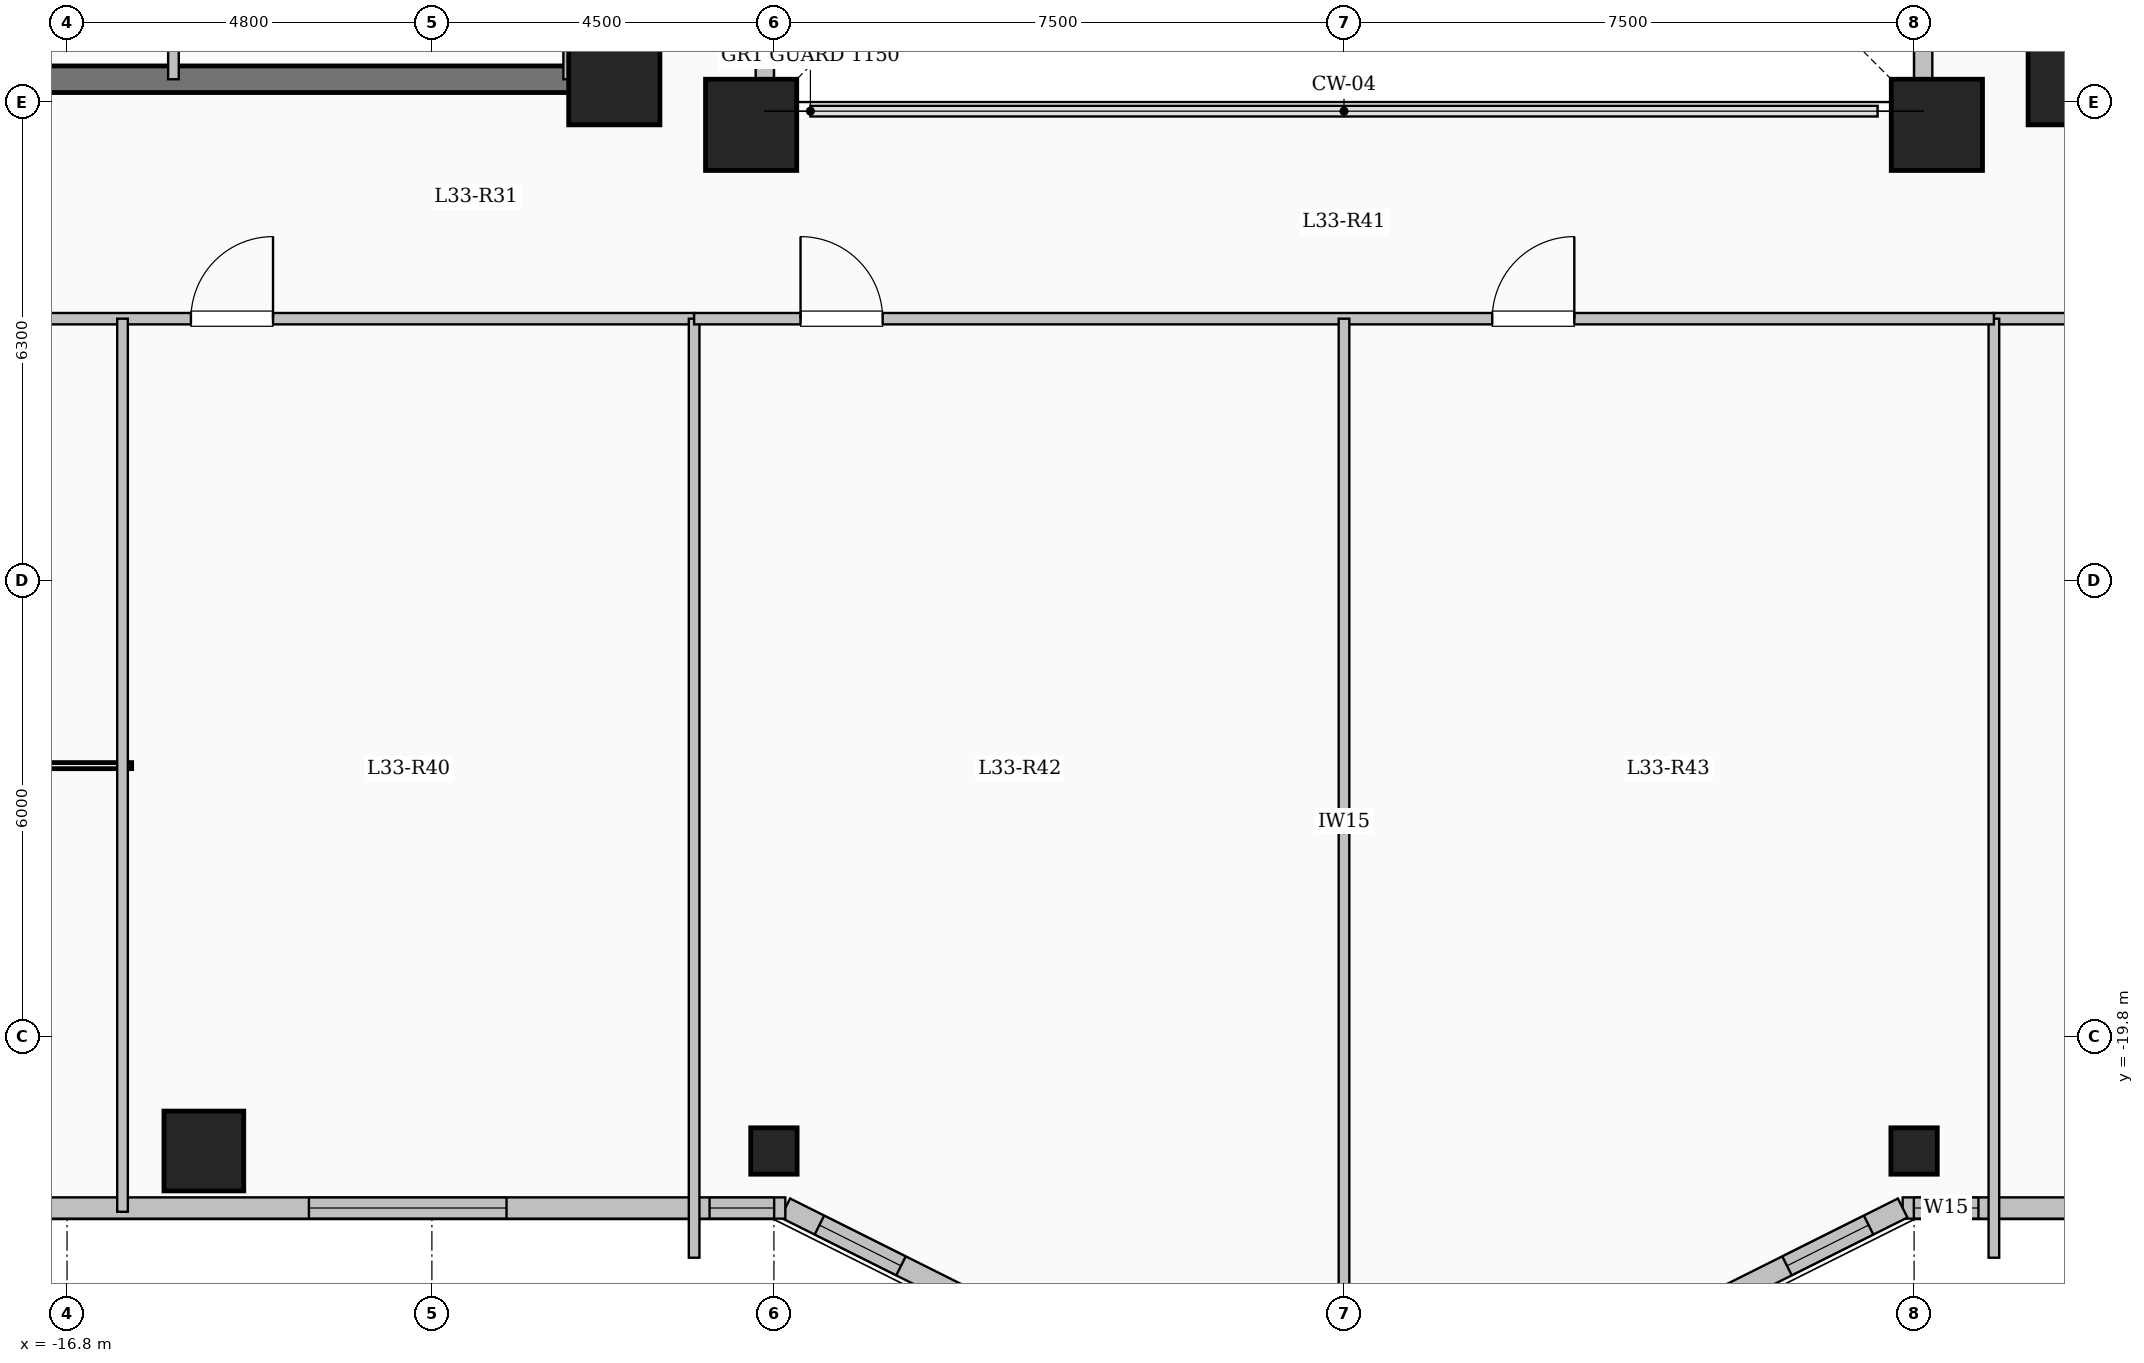
"""IFC4 building model, lengths in metres.
Left out: names, types, materials, properties, quantities, classifications, styles, units other than length and angle.
Written with IfcOpenShell. Run it as: python <this file> out.ifc"""

import sys

from ifc_helpers import new_model, si_unit, direction, frame, frame_2d, origin, origin_2d, place, context, subcontext, project, spatial, rectangle, hollow_circle, extrude, element, fill, save


model = new_model("IFC4")
c1 = context("Model", 3, precision=1e-05, world=origin(), true_north=direction((0.0, 1.0)))
c2 = subcontext(c1, "Body", "Model", "MODEL_VIEW")
j1 = project(units=[si_unit("LENGTHUNIT", "METRE"), si_unit("PLANEANGLEUNIT", "RADIAN")], contexts=[c1])
p1 = place(None, origin())
s1 = spatial("IfcSite", under=j1, at=p1, CompositionType="ELEMENT")
p2 = place(p1, origin())
s2 = spatial("IfcBuilding", under=s1, at=p2, CompositionType="ELEMENT")
p3 = place(p2, frame((0.0, 0.0, 123.0)))
s3 = spatial("IfcBuildingStorey", under=s2, at=p3, CompositionType="ELEMENT", Elevation=123.0)
for number, where, z_axis, x_axis in (
    (1, (-7.8, -7.8, 0.0), (0.0, 0.0, 1.0), (1.0, 0.0, 0.0)),
    (2, (7.8, -7.8, 0.0), (0.0, 0.0, 1.0), (1.0, 0.0, 0.0)),
    (3, (-9.6, -7.2, 0.0), (0.0, 0.0, 1.0), (1.0, 0.0, 0.0)),
    (4, (9.6, -7.2, 0.0), (0.0, 0.0, 1.0), (1.0, 0.0, 0.0)),
):
    element("IfcColumn", number, at=place(p3, frame(where, z_axis=z_axis, x_axis=x_axis)), inside=s3, PredefinedType="COLUMN", context=c2, shape_type="SweptSolid", body=[
        extrude(rectangle(XDim=1.2, YDim=1.2, at=origin_2d()), origin(), (0.0, 0.0, 1.0), 4.5),
    ])
p4 = place(p3, frame((-15.0, -21.3, 0.0), z_axis=(0.0, 0.0, 1.0), x_axis=(1.0, 0.0, 0.0)))
e5 = element("IfcColumn", 5, at=p4, inside=s3, PredefinedType="COLUMN", context=c2, shape_type="SweptSolid", body=[
    extrude(rectangle(XDim=1.05, YDim=1.05, at=origin_2d()), origin(), (0.0, 0.0, 1.0), 4.5),
])
for number, where, z_axis, x_axis in (
    (6, (-7.5, -21.3, 0.0), (0.0, 0.0, 1.0), (1.0, 0.0, 0.0)),
    (7, (7.5, -21.3, 0.0), (0.0, 0.0, 1.0), (1.0, 0.0, 0.0)),
):
    element("IfcColumn", number, at=place(p3, frame(where, z_axis=z_axis, x_axis=x_axis)), inside=s3, PredefinedType="COLUMN", context=c2, shape_type="SweptSolid", body=[
        extrude(hollow_circle(Radius=0.305, WallThickness=0.025, at=origin_2d()), origin(), (0.0, 0.0, 1.0), 4.5),
    ])
p5 = place(p3, frame((7.62, -7.62, 0.0), z_axis=(0.0, 0.0, 1.0), x_axis=(0.0, 1.0, 0.0)))
e8 = element("IfcWall", 8, at=p5, inside=s3, PredefinedType="SOLIDWALL", context=c2, shape_type="SweptSolid", body=[
    extrude(rectangle(XDim=15.24, YDim=0.24, at=frame_2d((7.62, 0.0))), origin(), (0.0, 0.0, 1.0), 4.2),
])
p6 = place(p5, frame((6.92, 0.0, 0.95)))
e9 = element("IfcOpeningElement", 9, at=p6, cuts=e8, PredefinedType="OPENING", context=c2, shape_type="SweptSolid", body=[
    extrude(rectangle(XDim=1.4, YDim=1.5, at=frame_2d((0.7, 0.75))), frame((0.0, 0.13, 0.0), z_axis=(0.0, -1.0, 0.0), x_axis=(1.0, 0.0, 0.0)), (0.0, 0.0, 1.0), 0.26),
])
p7 = place(p3, frame((-7.62, 7.62, 0.0), z_axis=(0.0, 0.0, 1.0), x_axis=(0.0, -1.0, 0.0)))
e10 = element("IfcWall", 10, at=p7, inside=s3, PredefinedType="SOLIDWALL", context=c2, shape_type="SweptSolid", body=[
    extrude(rectangle(XDim=15.24, YDim=0.24, at=frame_2d((7.62, 0.0))), origin(), (0.0, 0.0, 1.0), 4.2),
])
p8 = place(p7, frame((6.92, 0.0, 0.95)))
e11 = element("IfcOpeningElement", 11, at=p8, cuts=e10, PredefinedType="OPENING", context=c2, shape_type="SweptSolid", body=[
    extrude(rectangle(XDim=1.4, YDim=1.5, at=frame_2d((0.7, 0.75))), frame((0.0, 0.13, 0.0), z_axis=(0.0, -1.0, 0.0), x_axis=(1.0, 0.0, 0.0)), (0.0, 0.0, 1.0), 0.26),
])
p9 = place(p3, frame((21.15, -22.05, 0.0), z_axis=(0.0, 0.0, 1.0), x_axis=(-1.0, 0.0, 0.0)))
e12 = element("IfcWall", 12, at=p9, inside=s3, PredefinedType="SOLIDWALL", context=c2, shape_type="SweptSolid", body=[
    extrude(rectangle(XDim=13.8, YDim=0.28, at=frame_2d((6.9, 0.0))), origin(), (0.0, 0.0, 1.0), 4.2),
])
p10 = place(p9, frame((1.862, 0.0, 0.85)))
e13 = element("IfcOpeningElement", 13, at=p10, cuts=e12, PredefinedType="OPENING", context=c2, shape_type="SweptSolid", body=[
    extrude(rectangle(XDim=2.6, YDim=2.4, at=frame_2d((1.3, 1.2))), frame((0.0, 0.15, 0.0), z_axis=(0.0, -1.0, 0.0), x_axis=(1.0, 0.0, 0.0)), (0.0, 0.0, 1.0), 0.3),
])
p11 = place(p9, frame((8.159, 0.0, 0.85)))
e14 = element("IfcOpeningElement", 14, at=p11, cuts=e12, PredefinedType="OPENING", context=c2, shape_type="SweptSolid", body=[
    extrude(rectangle(XDim=2.6, YDim=2.4, at=frame_2d((1.3, 1.2))), frame((0.0, 0.15, 0.0), z_axis=(0.0, -1.0, 0.0), x_axis=(1.0, 0.0, 0.0)), (0.0, 0.0, 1.0), 0.3),
])
p12 = place(p9, frame((12.803, 0.0, 0.95)))
e15 = element("IfcOpeningElement", 15, at=p12, cuts=e12, PredefinedType="OPENING", context=c2, shape_type="SweptSolid", body=[
    extrude(rectangle(XDim=0.85, YDim=1.5, at=frame_2d((0.425, 0.75))), frame((0.0, 0.15, 0.0), z_axis=(0.0, -1.0, 0.0), x_axis=(1.0, 0.0, 0.0)), (0.0, 0.0, 1.0), 0.3),
])
p13 = place(p3, frame((7.35, -22.05, 0.0), z_axis=(0.0, 0.0, 1.0), x_axis=(-0.894427191, -0.4472135955, 0.0)))
e16 = element("IfcWall", 16, at=p13, inside=s3, PredefinedType="SOLIDWALL", context=c2, shape_type="SweptSolid", body=[
    extrude(rectangle(XDim=3.354, YDim=0.28, at=frame_2d((1.677, 0.0))), origin(), (0.0, 0.0, 1.0), 4.2),
])
p14 = place(p13, frame((0.501, 0.0, 0.95)))
e17 = element("IfcOpeningElement", 17, at=p14, cuts=e16, PredefinedType="OPENING", context=c2, shape_type="SweptSolid", body=[
    extrude(rectangle(XDim=1.2, YDim=1.5, at=frame_2d((0.6, 0.75))), frame((0.0, 0.15, 0.0), z_axis=(0.0, -1.0, 0.0), x_axis=(1.0, 0.0, 0.0)), (0.0, 0.0, 1.0), 0.3),
])
p15 = place(p3, frame((-4.35, -23.55, 0.0), z_axis=(0.0, 0.0, 1.0), x_axis=(-0.894427191, 0.4472135955, 0.0)))
e18 = element("IfcWall", 18, at=p15, inside=s3, PredefinedType="SOLIDWALL", context=c2, shape_type="SweptSolid", body=[
    extrude(rectangle(XDim=3.354, YDim=0.28, at=frame_2d((1.677, 0.0))), origin(), (0.0, 0.0, 1.0), 4.2),
])
p16 = place(p15, frame((1.653, 0.0, 0.95)))
e19 = element("IfcOpeningElement", 19, at=p16, cuts=e18, PredefinedType="OPENING", context=c2, shape_type="SweptSolid", body=[
    extrude(rectangle(XDim=1.2, YDim=1.5, at=frame_2d((0.6, 0.75))), frame((0.0, 0.15, 0.0), z_axis=(0.0, -1.0, 0.0), x_axis=(1.0, 0.0, 0.0)), (0.0, 0.0, 1.0), 0.3),
])
p17 = place(p3, frame((-7.35, -22.05, 0.0), z_axis=(0.0, 0.0, 1.0), x_axis=(-1.0, 0.0, 0.0)))
e20 = element("IfcWall", 20, at=p17, inside=s3, PredefinedType="SOLIDWALL", context=c2, shape_type="SweptSolid", body=[
    extrude(rectangle(XDim=13.8, YDim=0.28, at=frame_2d((6.9, 0.0))), origin(), (0.0, 0.0, 1.0), 4.2),
])
p18 = place(p17, frame((0.147, 0.0, 0.95)))
e21 = element("IfcOpeningElement", 21, at=p18, cuts=e20, PredefinedType="OPENING", context=c2, shape_type="SweptSolid", body=[
    extrude(rectangle(XDim=0.85, YDim=1.5, at=frame_2d((0.425, 0.75))), frame((0.0, 0.15, 0.0), z_axis=(0.0, -1.0, 0.0), x_axis=(1.0, 0.0, 0.0)), (0.0, 0.0, 1.0), 0.3),
])
p19 = place(p17, frame((3.668, 0.0, 0.85)))
e22 = element("IfcOpeningElement", 22, at=p19, cuts=e20, PredefinedType="OPENING", context=c2, shape_type="SweptSolid", body=[
    extrude(rectangle(XDim=2.6, YDim=2.4, at=frame_2d((1.3, 1.2))), frame((0.0, 0.15, 0.0), z_axis=(0.0, -1.0, 0.0), x_axis=(1.0, 0.0, 0.0)), (0.0, 0.0, 1.0), 0.3),
])
p20 = place(p17, frame((9.966, 0.0, 0.85)))
e23 = element("IfcOpeningElement", 23, at=p20, cuts=e20, PredefinedType="OPENING", context=c2, shape_type="SweptSolid", body=[
    extrude(rectangle(XDim=2.6, YDim=2.4, at=frame_2d((1.3, 1.2))), frame((0.0, 0.15, 0.0), z_axis=(0.0, -1.0, 0.0), x_axis=(1.0, 0.0, 0.0)), (0.0, 0.0, 1.0), 0.3),
])
p21 = place(p3, frame((-18.625, -7.2, 0.0), z_axis=(0.0, 0.0, 1.0), x_axis=(1.0, 0.0, 0.0)))
e24 = element("IfcWall", 24, at=p21, inside=s3, PredefinedType="SHEAR", context=c2, shape_type="SweptSolid", body=[
    extrude(rectangle(XDim=8.55, YDim=0.35, at=frame_2d((4.275, 0.0))), origin(), (0.0, 0.0, 1.0), 4.5),
])
p22 = place(p3, frame((-15.4, -7.2, 0.0), z_axis=(0.0, 0.0, 1.0), x_axis=(0.0, 1.0, 0.0)))
e25 = element("IfcWall", 25, at=p22, inside=s3, PredefinedType="PARTITIONING", context=c2, shape_type="SweptSolid", body=[
    extrude(rectangle(XDim=10.45, YDim=0.14, at=frame_2d((5.225, 0.0))), origin(), (0.0, 0.0, 1.0), 4.2),
])
p23 = place(p22, frame((9.25, 0.0, 0.0)))
e26 = element("IfcOpeningElement", 26, at=p23, cuts=e25, PredefinedType="OPENING", context=c2, shape_type="SweptSolid", body=[
    extrude(rectangle(XDim=0.9, YDim=2.08, at=frame_2d((0.45, 1.04))), frame((0.0, 0.08, 0.0), z_axis=(0.0, -1.0, 0.0), x_axis=(1.0, 0.0, 0.0)), (0.0, 0.0, 1.0), 0.16),
])
p24 = place(p3, frame((-10.2, -7.2, 0.0), z_axis=(0.0, 0.0, 1.0), x_axis=(0.0, 1.0, 0.0)))
e27 = element("IfcWall", 27, at=p24, inside=s3, PredefinedType="PARTITIONING", context=c2, shape_type="SweptSolid", body=[
    extrude(rectangle(XDim=9.12, YDim=0.14, at=frame_2d((4.56, 0.0))), origin(), (0.0, 0.0, 1.0), 4.2),
])
p25 = place(p24, frame((1.9, 0.0, 0.0)))
e28 = element("IfcOpeningElement", 28, at=p25, cuts=e27, PredefinedType="OPENING", context=c2, shape_type="SweptSolid", body=[
    extrude(rectangle(XDim=0.95, YDim=2.12, at=frame_2d((0.475, 1.06))), frame((0.0, 0.08, 0.0), z_axis=(0.0, -1.0, 0.0), x_axis=(1.0, 0.0, 0.0)), (0.0, 0.0, 1.0), 0.16),
])
p26 = place(p24, frame((5.0, 0.0, 0.0)))
e29 = element("IfcOpeningElement", 29, at=p26, cuts=e27, PredefinedType="OPENING", context=c2, shape_type="SweptSolid", body=[
    extrude(rectangle(XDim=0.95, YDim=2.12, at=frame_2d((0.475, 1.06))), frame((0.0, 0.08, 0.0), z_axis=(0.0, -1.0, 0.0), x_axis=(1.0, 0.0, 0.0)), (0.0, 0.0, 1.0), 0.16),
])
p27 = place(p3, frame((-21.05, -10.35, 0.0), z_axis=(0.0, 0.0, 1.0), x_axis=(1.0, 0.0, 0.0)))
e30 = element("IfcWall", 30, at=p27, inside=s3, PredefinedType="PARTITIONING", context=c2, shape_type="SweptSolid", body=[
    extrude(rectangle(XDim=12.5, YDim=0.15, at=frame_2d((6.25, 0.0))), origin(), (0.0, 0.0, 1.0), 4.2),
])
p28 = place(p27, frame((1.1, 0.0, 0.0)))
e31 = element("IfcOpeningElement", 31, at=p28, cuts=e30, PredefinedType="OPENING", context=c2, shape_type="SweptSolid", body=[
    extrude(rectangle(XDim=1.08, YDim=2.15, at=frame_2d((0.54, 1.075))), frame((0.0, 0.085, 0.0), z_axis=(0.0, -1.0, 0.0), x_axis=(1.0, 0.0, 0.0)), (0.0, 0.0, 1.0), 0.17),
])
p29 = place(p27, frame((5.88, 0.0, 0.0)))
e32 = element("IfcOpeningElement", 32, at=p29, cuts=e30, PredefinedType="OPENING", context=c2, shape_type="SweptSolid", body=[
    extrude(rectangle(XDim=1.08, YDim=2.15, at=frame_2d((0.54, 1.075))), frame((0.0, 0.085, 0.0), z_axis=(0.0, -1.0, 0.0), x_axis=(1.0, 0.0, 0.0)), (0.0, 0.0, 1.0), 0.17),
])
p30 = place(p3, frame((8.55, -10.35, 0.0), z_axis=(0.0, 0.0, 1.0), x_axis=(1.0, 0.0, 0.0)))
e33 = element("IfcWall", 33, at=p30, inside=s3, PredefinedType="PARTITIONING", context=c2, shape_type="SweptSolid", body=[
    extrude(rectangle(XDim=12.5, YDim=0.15, at=frame_2d((6.25, 0.0))), origin(), (0.0, 0.0, 1.0), 4.2),
])
p31 = place(p30, frame((1.1, 0.0, 0.0)))
e34 = element("IfcOpeningElement", 34, at=p31, cuts=e33, PredefinedType="OPENING", context=c2, shape_type="SweptSolid", body=[
    extrude(rectangle(XDim=1.08, YDim=2.15, at=frame_2d((0.54, 1.075))), frame((0.0, 0.085, 0.0), z_axis=(0.0, -1.0, 0.0), x_axis=(1.0, 0.0, 0.0)), (0.0, 0.0, 1.0), 0.17),
])
p32 = place(p30, frame((7.275, 0.0, 0.0)))
e35 = element("IfcOpeningElement", 35, at=p32, cuts=e33, PredefinedType="OPENING", context=c2, shape_type="SweptSolid", body=[
    extrude(rectangle(XDim=1.2, YDim=2.15, at=frame_2d((0.6, 1.075))), frame((0.0, 0.085, 0.0), z_axis=(0.0, -1.0, 0.0), x_axis=(1.0, 0.0, 0.0)), (0.0, 0.0, 1.0), 0.17),
])
p33 = place(p3, frame((-16.07, -22.1, 0.0), z_axis=(0.0, 0.0, 1.0), x_axis=(0.0, 1.0, 0.0)))
e36 = element("IfcWall", 36, at=p33, inside=s3, PredefinedType="PARTITIONING", context=c2, shape_type="SweptSolid", body=[
    extrude(rectangle(XDim=11.75, YDim=0.14, at=frame_2d((5.875, 0.0))), origin(), (0.0, 0.0, 1.0), 4.2),
])
for number, where, z_axis, x_axis in (
    (37, (-8.55, -22.704, 0.0), (0.0, 0.0, 1.0), (0.0, 1.0, 0.0)),
    (38, (8.55, -22.704, 0.0), (0.0, 0.0, 1.0), (0.0, 1.0, 0.0)),
):
    element("IfcWall", number, at=place(p3, frame(where, z_axis=z_axis, x_axis=x_axis)), inside=s3, PredefinedType="PARTITIONING", context=c2, shape_type="SweptSolid", body=[
        extrude(rectangle(XDim=12.354, YDim=0.14, at=frame_2d((6.177, 0.0))), origin(), (0.0, 0.0, 1.0), 4.2),
    ])
p34 = place(p3, frame((-8.55, -10.35, 0.0), z_axis=(0.0, 0.0, 1.0), x_axis=(1.0, 0.0, 0.0)))
e39 = element("IfcWall", 39, at=p34, inside=s3, PredefinedType="PARTITIONING", context=c2, shape_type="SweptSolid", body=[
    extrude(rectangle(XDim=17.1, YDim=0.15, at=frame_2d((8.55, 0.0))), origin(), (0.0, 0.0, 1.0), 4.2),
])
p35 = place(p34, frame((1.4, 0.0, 0.0)))
e40 = element("IfcOpeningElement", 40, at=p35, cuts=e39, PredefinedType="OPENING", context=c2, shape_type="SweptSolid", body=[
    extrude(rectangle(XDim=1.08, YDim=2.15, at=frame_2d((0.54, 1.075))), frame((0.0, 0.085, 0.0), z_axis=(0.0, -1.0, 0.0), x_axis=(1.0, 0.0, 0.0)), (0.0, 0.0, 1.0), 0.17),
])
p36 = place(p34, frame((10.5, 0.0, 0.0)))
e41 = element("IfcOpeningElement", 41, at=p36, cuts=e39, PredefinedType="OPENING", context=c2, shape_type="SweptSolid", body=[
    extrude(rectangle(XDim=1.08, YDim=2.15, at=frame_2d((0.54, 1.075))), frame((0.0, 0.085, 0.0), z_axis=(0.0, -1.0, 0.0), x_axis=(1.0, 0.0, 0.0)), (0.0, 0.0, 1.0), 0.17),
])
p37 = place(p3, frame((0.0, -23.58, 0.0), z_axis=(0.0, 0.0, 1.0), x_axis=(0.0, 1.0, 0.0)))
e42 = element("IfcWall", 42, at=p37, inside=s3, PredefinedType="PARTITIONING", context=c2, shape_type="SweptSolid", body=[
    extrude(rectangle(XDim=13.23, YDim=0.14, at=frame_2d((6.615, 0.0))), origin(), (0.0, 0.0, 1.0), 4.2),
])
p38 = place(p12, origin())
e43 = element("IfcWindow", 43, at=p38, inside=s3, PartitioningType="SINGLE_PANEL", PredefinedType="WINDOW", context=c2, shape_type="SweptSolid", body=[
    extrude(rectangle(XDim=0.85, YDim=1.5, at=frame_2d((0.425, 0.75))), frame((0.0, 0.03, 0.0), z_axis=(0.0, -1.0, 0.0), x_axis=(1.0, 0.0, 0.0)), (0.0, 0.0, 1.0), 0.06),
])
fill(e15, e43)
p39 = place(p14, origin())
e44 = element("IfcWindow", 44, at=p39, inside=s3, PartitioningType="SINGLE_PANEL", PredefinedType="WINDOW", context=c2, shape_type="SweptSolid", body=[
    extrude(rectangle(XDim=1.2, YDim=1.5, at=frame_2d((0.6, 0.75))), frame((0.0, 0.03, 0.0), z_axis=(0.0, -1.0, 0.0), x_axis=(1.0, 0.0, 0.0)), (0.0, 0.0, 1.0), 0.06),
])
fill(e17, e44)
p40 = place(p16, origin())
e45 = element("IfcWindow", 45, at=p40, inside=s3, PartitioningType="SINGLE_PANEL", PredefinedType="WINDOW", context=c2, shape_type="SweptSolid", body=[
    extrude(rectangle(XDim=1.2, YDim=1.5, at=frame_2d((0.6, 0.75))), frame((0.0, 0.03, 0.0), z_axis=(0.0, -1.0, 0.0), x_axis=(1.0, 0.0, 0.0)), (0.0, 0.0, 1.0), 0.06),
])
fill(e19, e45)
p41 = place(p18, origin())
e46 = element("IfcWindow", 46, at=p41, inside=s3, PartitioningType="SINGLE_PANEL", PredefinedType="WINDOW", context=c2, shape_type="SweptSolid", body=[
    extrude(rectangle(XDim=0.85, YDim=1.5, at=frame_2d((0.425, 0.75))), frame((0.0, 0.03, 0.0), z_axis=(0.0, -1.0, 0.0), x_axis=(1.0, 0.0, 0.0)), (0.0, 0.0, 1.0), 0.06),
])
fill(e21, e46)
p42 = place(p19, origin())
e47 = element("IfcWindow", 47, at=p42, inside=s3, PartitioningType="SINGLE_PANEL", PredefinedType="WINDOW", context=c2, shape_type="SweptSolid", body=[
    extrude(rectangle(XDim=2.6, YDim=2.4, at=frame_2d((1.3, 1.2))), frame((0.0, 0.03, 0.0), z_axis=(0.0, -1.0, 0.0), x_axis=(1.0, 0.0, 0.0)), (0.0, 0.0, 1.0), 0.06),
])
fill(e22, e47)
p43 = place(p29, origin())
e48 = element("IfcDoor", 48, at=p43, inside=s3, OperationType="SINGLE_SWING_RIGHT", PredefinedType="DOOR", context=c2, shape_type="SweptSolid", body=[
    extrude(rectangle(XDim=1.08, YDim=2.15, at=frame_2d((0.54, 1.075))), frame((0.0, 0.025, 0.0), z_axis=(0.0, -1.0, 0.0), x_axis=(1.0, 0.0, 0.0)), (0.0, 0.0, 1.0), 0.05),
])
fill(e32, e48)
p44 = place(p35, origin())
e49 = element("IfcDoor", 49, at=p44, inside=s3, OperationType="SINGLE_SWING_LEFT", PredefinedType="DOOR", context=c2, shape_type="SweptSolid", body=[
    extrude(rectangle(XDim=1.08, YDim=2.15, at=frame_2d((0.54, 1.075))), frame((0.0, 0.025, 0.0), z_axis=(0.0, -1.0, 0.0), x_axis=(1.0, 0.0, 0.0)), (0.0, 0.0, 1.0), 0.05),
])
fill(e40, e49)
p45 = place(p36, origin())
e50 = element("IfcDoor", 50, at=p45, inside=s3, OperationType="SINGLE_SWING_RIGHT", PredefinedType="DOOR", context=c2, shape_type="SweptSolid", body=[
    extrude(rectangle(XDim=1.08, YDim=2.15, at=frame_2d((0.54, 1.075))), frame((0.0, 0.025, 0.0), z_axis=(0.0, -1.0, 0.0), x_axis=(1.0, 0.0, 0.0)), (0.0, 0.0, 1.0), 0.05),
])
fill(e41, e50)
save(model, sys.argv[1])
